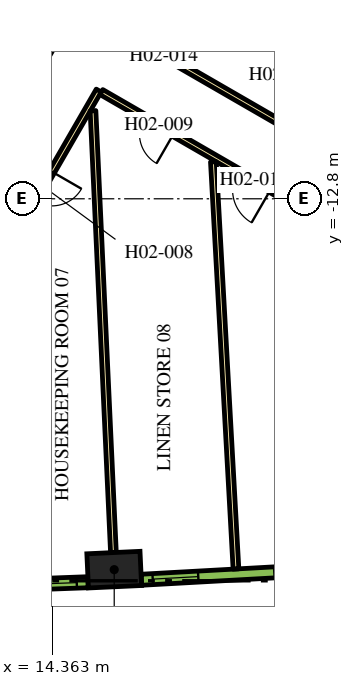
"""IFC4 building model, lengths in metres.
Left out: names, types, materials, properties, quantities, classifications, styles, units other than length and angle.
Written with IfcOpenShell. Run it as: python <this file> out.ifc"""

import sys

from ifc_helpers import new_model, si_unit, direction, frame, frame_2d, origin, origin_2d, place, context, subcontext, project, spatial, rectangle, extrude, element, fill, save


model = new_model("IFC4")
c1 = context("Model", 3, precision=1e-05, world=origin(), true_north=direction((0.0, 1.0)))
c2 = subcontext(c1, "Body", "Model", "MODEL_VIEW")
j1 = project(units=[si_unit("LENGTHUNIT", "METRE"), si_unit("PLANEANGLEUNIT", "RADIAN")], contexts=[c1])
p1 = place(None, origin())
s1 = spatial("IfcSite", under=j1, at=p1, CompositionType="ELEMENT")
p2 = place(p1, origin())
s2 = spatial("IfcBuilding", under=s1, at=p2, CompositionType="ELEMENT")
p3 = place(p2, frame((0.0, 0.0, 47.1)))
s3 = spatial("IfcBuildingStorey", under=s2, at=p3, CompositionType="ELEMENT", Elevation=47.1)
p4 = place(p3, frame((15.994, -22.558, 0.0), z_axis=(0.0, 0.0, 1.0), x_axis=(0.998932216029, 0.04619986774, 0.0)))
e1 = element("IfcColumn", 1, at=p4, inside=s3, PredefinedType="COLUMN", context=c2, shape_type="SweptSolid", body=[
    extrude(rectangle(XDim=1.4, YDim=0.9, at=origin_2d()), origin(), (0.0, 0.0, 1.0), 3.9),
])
p5 = place(p3, frame((11.943, -12.214, 0.0), z_axis=(0.0, 0.0, 1.0), x_axis=(0.49998092645, 0.866036415623, 0.0)))
e2 = element("IfcWall", 2, at=p5, inside=s3, PredefinedType="SOLIDWALL", context=c2, shape_type="SweptSolid", body=[
    extrude(rectangle(XDim=8.83, YDim=0.9, at=frame_2d((4.415, 0.0))), origin(), (0.0, 0.0, 1.0), 3.9),
])
p6 = place(p3, frame((12.885, -9.431, 0.0), z_axis=(0.0, 0.0, 1.0), x_axis=(0.500020560727, 0.866013532718, 0.0)))
e3 = element("IfcWall", 3, at=p6, inside=s3, PredefinedType="SOLIDWALL", context=c2, shape_type="SweptSolid", body=[
    extrude(rectangle(XDim=3.45, YDim=0.25, at=frame_2d((1.725, 0.0))), origin(), (0.0, 0.0, 1.0), 3.9),
])
p7 = place(p3, frame((16.412, -8.523, 0.0), z_axis=(0.0, 0.0, 1.0), x_axis=(0.866022197818, -0.500005552856, 0.0)))
e4 = element("IfcWall", 4, at=p7, inside=s3, PredefinedType="PARTITIONING", context=c2, shape_type="SweptSolid", body=[
    extrude(rectangle(XDim=16.224, YDim=0.15, at=frame_2d((8.112, 0.0))), origin(), (0.0, 0.0, 1.0), 2.75),
])
p8 = place(p7, frame((7.949, 0.0, 0.0)))
e5 = element("IfcOpeningElement", 5, at=p8, cuts=e4, PredefinedType="OPENING", context=c2, shape_type="SweptSolid", body=[
    extrude(rectangle(XDim=1.0, YDim=2.1, at=frame_2d((0.5, 1.05))), frame((0.0, 0.085, 0.0), z_axis=(0.0, -1.0, 0.0), x_axis=(1.0, 0.0, 0.0)), (0.0, 0.0, 1.0), 0.17),
])
p9 = place(p7, frame((0.526, 0.0, 0.0)))
e6 = element("IfcOpeningElement", 6, at=p9, cuts=e4, PredefinedType="OPENING", context=c2, shape_type="SweptSolid", body=[
    extrude(rectangle(XDim=1.0, YDim=2.1, at=frame_2d((0.5, 1.05))), frame((0.0, 0.085, 0.0), z_axis=(0.0, -1.0, 0.0), x_axis=(1.0, 0.0, 0.0)), (0.0, 0.0, 1.0), 0.17),
])
p10 = place(p3, frame((15.587, -9.952, 0.0), z_axis=(0.0, 0.0, 1.0), x_axis=(-0.500016618951, -0.866015808616, 0.0)))
e7 = element("IfcWall", 7, at=p10, inside=s3, PredefinedType="PARTITIONING", context=c2, shape_type="SweptSolid", body=[
    extrude(rectangle(XDim=5.268, YDim=0.15, at=frame_2d((2.634, 0.0))), origin(), (0.0, 0.0, 1.0), 2.75),
])
p11 = place(p10, frame((2.465, 0.0, 0.0)))
e8 = element("IfcOpeningElement", 8, at=p11, cuts=e7, PredefinedType="OPENING", context=c2, shape_type="SweptSolid", body=[
    extrude(rectangle(XDim=0.9, YDim=2.1, at=frame_2d((0.45, 1.05))), frame((0.0, 0.085, 0.0), z_axis=(0.0, -1.0, 0.0), x_axis=(1.0, 0.0, 0.0)), (0.0, 0.0, 1.0), 0.17),
])
p12 = place(p3, frame((29.638, -18.064, 0.0), z_axis=(0.0, 0.0, 1.0), x_axis=(-0.866026175601, 0.499998663172, 0.0)))
e9 = element("IfcWall", 9, at=p12, inside=s3, PredefinedType="PARTITIONING", context=c2, shape_type="SweptSolid", body=[
    extrude(rectangle(XDim=16.144, YDim=0.15, at=frame_2d((8.072, 0.0))), origin(), (0.0, 0.0, 1.0), 2.75),
])
p13 = place(p12, frame((13.948, 0.0, 0.0)))
e10 = element("IfcOpeningElement", 10, at=p13, cuts=e9, PredefinedType="OPENING", context=c2, shape_type="SweptSolid", body=[
    extrude(rectangle(XDim=0.9, YDim=2.1, at=frame_2d((0.45, 1.05))), frame((0.0, 0.085, 0.0), z_axis=(0.0, -1.0, 0.0), x_axis=(1.0, 0.0, 0.0)), (0.0, 0.0, 1.0), 0.17),
])
p14 = place(p12, frame((11.004, 0.0, 0.0)))
e11 = element("IfcOpeningElement", 11, at=p14, cuts=e9, PredefinedType="OPENING", context=c2, shape_type="SweptSolid", body=[
    extrude(rectangle(XDim=1.0, YDim=2.1, at=frame_2d((0.5, 1.05))), frame((0.0, 0.085, 0.0), z_axis=(0.0, -1.0, 0.0), x_axis=(1.0, 0.0, 0.0)), (0.0, 0.0, 1.0), 0.17),
])
p15 = place(p3, frame((15.973, -22.109, 0.0), z_axis=(0.0, 0.0, 1.0), x_axis=(-0.046191717129, 0.998932592955, 0.0)))
e12 = element("IfcWall", 12, at=p15, inside=s3, PredefinedType="PARTITIONING", context=c2, shape_type="SweptSolid", body=[
    extrude(rectangle(XDim=11.638, YDim=0.15, at=frame_2d((5.819, 0.0))), origin(), (0.0, 0.0, 1.0), 2.75),
])
p16 = place(p3, frame((19.198, -22.541, 0.0), z_axis=(0.0, 0.0, 1.0), x_axis=(-0.055432210572, 0.99846245299, 0.0)))
e13 = element("IfcWall", 13, at=p16, inside=s3, PredefinedType="PARTITIONING", context=c2, shape_type="SweptSolid", body=[
    extrude(rectangle(XDim=10.729, YDim=0.15, at=frame_2d((5.365, 0.0))), origin(), (0.0, 0.0, 1.0), 2.75),
])
p17 = place(p3, frame((10.31, -23.074, 0.0), z_axis=(0.0, 0.0, 1.0), x_axis=(0.999317974969, 0.036926750529, 0.0)))
e14 = element("IfcWall", 14, at=p17, inside=s3, PredefinedType="SOLIDWALL", context=c2, shape_type="SweptSolid", body=[
    extrude(rectangle(XDim=4.998, YDim=0.29, at=frame_2d((2.499, 0.0))), origin(), (0.0, 0.0, 1.0), 3.65),
])
p18 = place(p17, frame((0.297, 0.0, 0.9)))
e15 = element("IfcOpeningElement", 15, at=p18, cuts=e14, PredefinedType="OPENING", context=c2, shape_type="SweptSolid", body=[
    extrude(rectangle(XDim=1.2, YDim=2.15, at=frame_2d((0.6, 1.075))), frame((0.0, 0.155, 0.0), z_axis=(0.0, -1.0, 0.0), x_axis=(1.0, 0.0, 0.0)), (0.0, 0.0, 1.0), 0.31),
])
p19 = place(p17, frame((3.501, 0.0, 0.9)))
e16 = element("IfcOpeningElement", 16, at=p19, cuts=e14, PredefinedType="OPENING", context=c2, shape_type="SweptSolid", body=[
    extrude(rectangle(XDim=1.2, YDim=2.15, at=frame_2d((0.6, 1.075))), frame((0.0, 0.155, 0.0), z_axis=(0.0, -1.0, 0.0), x_axis=(1.0, 0.0, 0.0)), (0.0, 0.0, 1.0), 0.31),
])
p20 = place(p3, frame((16.711, -22.824, 0.0), z_axis=(0.0, 0.0, 1.0), x_axis=(0.998464708705, 0.055391564976, 0.0)))
e17 = element("IfcWall", 17, at=p20, inside=s3, PredefinedType="SOLIDWALL", context=c2, shape_type="SweptSolid", body=[
    extrude(rectangle(XDim=4.998, YDim=0.29, at=frame_2d((2.499, 0.0))), origin(), (0.0, 0.0, 1.0), 3.65),
])
p21 = place(p20, frame((0.297, 0.0, 0.9)))
e18 = element("IfcOpeningElement", 18, at=p21, cuts=e17, PredefinedType="OPENING", context=c2, shape_type="SweptSolid", body=[
    extrude(rectangle(XDim=1.2, YDim=2.15, at=frame_2d((0.6, 1.075))), frame((0.0, 0.155, 0.0), z_axis=(0.0, -1.0, 0.0), x_axis=(1.0, 0.0, 0.0)), (0.0, 0.0, 1.0), 0.31),
])
p22 = place(p20, frame((3.501, 0.0, 0.9)))
e19 = element("IfcOpeningElement", 19, at=p22, cuts=e17, PredefinedType="OPENING", context=c2, shape_type="SweptSolid", body=[
    extrude(rectangle(XDim=1.2, YDim=2.15, at=frame_2d((0.6, 1.075))), frame((0.0, 0.155, 0.0), z_axis=(0.0, -1.0, 0.0), x_axis=(1.0, 0.0, 0.0)), (0.0, 0.0, 1.0), 0.31),
])
p23 = place(p11, origin())
e20 = element("IfcDoor", 20, at=p23, inside=s3, OperationType="SINGLE_SWING_LEFT", PredefinedType="DOOR", context=c2, shape_type="SweptSolid", body=[
    extrude(rectangle(XDim=0.9, YDim=2.1, at=frame_2d((0.45, 1.05))), frame((0.0, 0.025, 0.0), z_axis=(0.0, -1.0, 0.0), x_axis=(1.0, 0.0, 0.0)), (0.0, 0.0, 1.0), 0.05),
])
fill(e8, e20)
p24 = place(p13, origin())
e21 = element("IfcDoor", 21, at=p24, inside=s3, OperationType="SINGLE_SWING_RIGHT", PredefinedType="DOOR", context=c2, shape_type="SweptSolid", body=[
    extrude(rectangle(XDim=0.9, YDim=2.1, at=frame_2d((0.45, 1.05))), frame((0.0, 0.025, 0.0), z_axis=(0.0, -1.0, 0.0), x_axis=(1.0, 0.0, 0.0)), (0.0, 0.0, 1.0), 0.05),
])
fill(e10, e21)
p25 = place(p14, origin())
e22 = element("IfcDoor", 22, at=p25, inside=s3, OperationType="SINGLE_SWING_RIGHT", PredefinedType="DOOR", context=c2, shape_type="SweptSolid", body=[
    extrude(rectangle(XDim=1.0, YDim=2.1, at=frame_2d((0.5, 1.05))), frame((0.0, 0.025, 0.0), z_axis=(0.0, -1.0, 0.0), x_axis=(1.0, 0.0, 0.0)), (0.0, 0.0, 1.0), 0.05),
])
fill(e11, e22)
p26 = place(p9, origin())
e23 = element("IfcDoor", 23, at=p26, inside=s3, OperationType="SINGLE_SWING_LEFT", PredefinedType="DOOR", context=c2, shape_type="SweptSolid", body=[
    extrude(rectangle(XDim=1.0, YDim=2.1, at=frame_2d((0.5, 1.05))), frame((0.0, 0.025, 0.0), z_axis=(0.0, -1.0, 0.0), x_axis=(1.0, 0.0, 0.0)), (0.0, 0.0, 1.0), 0.05),
])
fill(e6, e23)
p27 = place(p19, origin())
e24 = element("IfcWindow", 24, at=p27, inside=s3, PartitioningType="DOUBLE_PANEL_VERTICAL", PredefinedType="WINDOW", context=c2, shape_type="SweptSolid", body=[
    extrude(rectangle(XDim=1.2, YDim=2.15, at=frame_2d((0.6, 1.075))), frame((0.0, 0.015, 0.0), z_axis=(0.0, -1.0, 0.0), x_axis=(1.0, 0.0, 0.0)), (0.0, 0.0, 1.0), 0.06),
])
fill(e16, e24)
p28 = place(p21, origin())
e25 = element("IfcWindow", 25, at=p28, inside=s3, PartitioningType="DOUBLE_PANEL_VERTICAL", PredefinedType="WINDOW", context=c2, shape_type="SweptSolid", body=[
    extrude(rectangle(XDim=1.2, YDim=2.15, at=frame_2d((0.6, 1.075))), frame((0.0, 0.015, 0.0), z_axis=(0.0, -1.0, 0.0), x_axis=(1.0, 0.0, 0.0)), (0.0, 0.0, 1.0), 0.06),
])
fill(e18, e25)
save(model, sys.argv[1])
